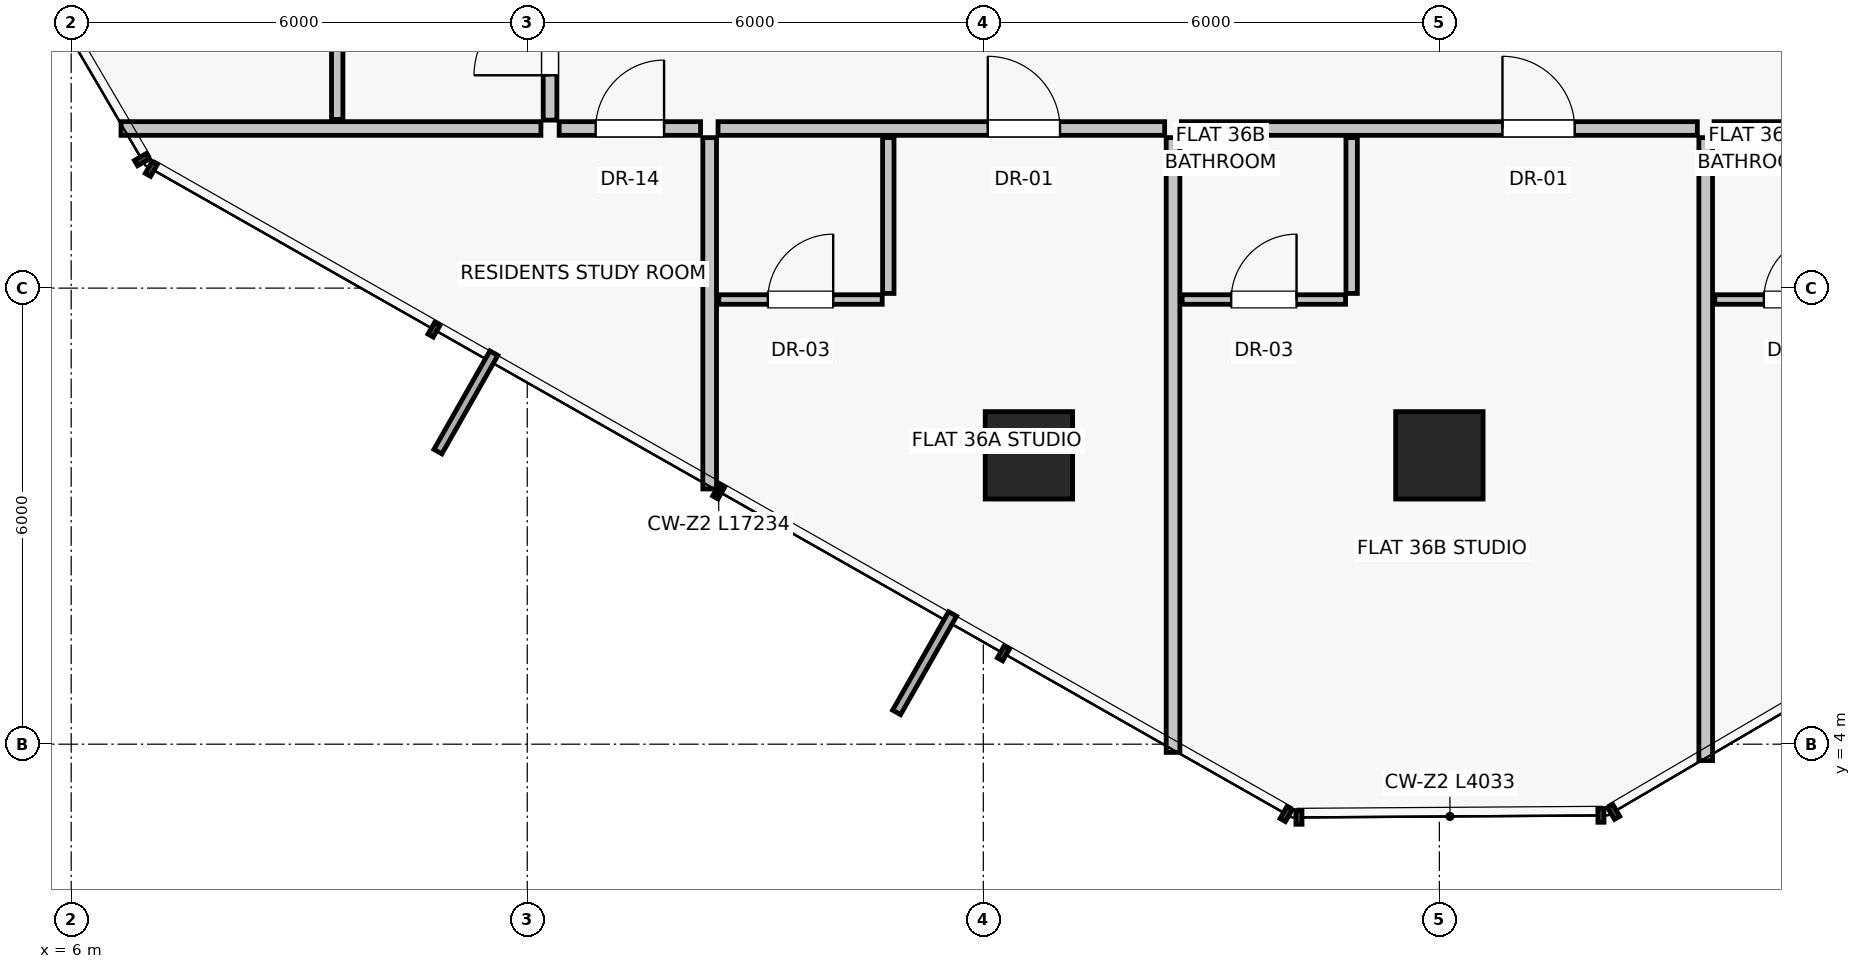
"""IFC4 building model, lengths in metres.
Left out: names, types, materials, properties, quantities, classifications, styles, units other than length and angle.
Written with IfcOpenShell. Run it as: python <this file> out.ifc"""

import sys

from ifc_helpers import new_model, si_unit, direction, frame, frame_2d, origin, origin_2d, place, context, subcontext, project, spatial, rectangle, extrude, source, transform, mapped, element, fill, save


model = new_model("IFC4")
c1 = context("Model", 3, precision=1e-05, world=origin(), true_north=direction((0.0, 1.0)))
c2 = subcontext(c1, "Body", "Model", "MODEL_VIEW")
j1 = project(units=[si_unit("LENGTHUNIT", "METRE"), si_unit("PLANEANGLEUNIT", "RADIAN")], contexts=[c1])
p1 = place(None, origin())
s1 = spatial("IfcSite", under=j1, at=p1, CompositionType="ELEMENT")
p2 = place(p1, origin())
s2 = spatial("IfcBuilding", under=s1, at=p2, CompositionType="ELEMENT")
p3 = place(p2, frame((0.0, 0.0, 129.5)))
s3 = spatial("IfcBuildingStorey", under=s2, at=p3, CompositionType="ELEMENT", Elevation=129.5)
for number, where, z_axis, x_axis in (
    (1, (18.6, 7.8, 0.0), (0.0, 0.0, 1.0), (1.0, 0.0, 0.0)),
    (2, (24.0, 7.8, 0.0), (0.0, 0.0, 1.0), (1.0, 0.0, 0.0)),
):
    element("IfcColumn", number, at=place(p3, frame(where, z_axis=z_axis, x_axis=x_axis)), inside=s3, PredefinedType="COLUMN", context=c2, shape_type="SweptSolid", body=[
        extrude(rectangle(XDim=1.15, YDim=1.15, at=origin_2d()), origin(), (0.0, 0.0, 1.0), 3.25),
    ])
p4 = place(p3, frame((14.4, 11.98, 0.0), z_axis=(0.0, 0.0, 1.0), x_axis=(0.0, -1.0, 0.0)))
e3 = element("IfcWall", 3, at=p4, inside=s3, PredefinedType="PARTITIONING", context=c2, shape_type="SweptSolid", body=[
    extrude(rectangle(XDim=4.623, YDim=0.18, at=frame_2d((2.311, 0.0))), origin(), (0.0, 0.0, 1.0), 3.0),
])
p5 = place(p3, frame((14.51, 12.1, 0.0), z_axis=(0.0, 0.0, 1.0), x_axis=(1.0, 0.0, 0.0)))
e4 = element("IfcWall", 4, at=p5, inside=s3, PredefinedType="PARTITIONING", context=c2, shape_type="SweptSolid", body=[
    extrude(rectangle(XDim=5.876, YDim=0.18, at=frame_2d((2.938, 0.0))), origin(), (0.0, 0.0, 1.0), 2.58),
])
p6 = place(p5, frame((3.549, 0.0, 0.0)))
e5 = element("IfcOpeningElement", 5, at=p6, cuts=e4, PredefinedType="OPENING", context=c2, shape_type="SweptSolid", body=[
    extrude(rectangle(XDim=0.95, YDim=2.02, at=frame_2d((0.475, 1.01))), frame((0.0, 0.1, 0.0), z_axis=(0.0, -1.0, 0.0), x_axis=(1.0, 0.0, 0.0)), (0.0, 0.0, 1.0), 0.2),
])
p7 = place(p3, frame((16.75, 11.98, 0.0), z_axis=(0.0, 0.0, 1.0), x_axis=(0.0, -1.0, 0.0)))
e6 = element("IfcWall", 6, at=p7, inside=s3, PredefinedType="PARTITIONING", context=c2, shape_type="SweptSolid", body=[
    extrude(rectangle(XDim=2.05, YDim=0.15, at=frame_2d((1.025, 0.0))), origin(), (0.0, 0.0, 1.0), 3.0),
])
p8 = place(p3, frame((14.52, 9.85, 0.0), z_axis=(0.0, 0.0, 1.0), x_axis=(1.0, 0.0, 0.0)))
e7 = element("IfcWall", 7, at=p8, inside=s3, PredefinedType="PARTITIONING", context=c2, shape_type="SweptSolid", body=[
    extrude(rectangle(XDim=2.15, YDim=0.125, at=frame_2d((1.075, 0.0))), origin(), (0.0, 0.0, 1.0), 3.0),
])
p9 = place(p8, frame((0.645, 0.0, 0.0)))
e8 = element("IfcOpeningElement", 8, at=p9, cuts=e7, PredefinedType="OPENING", context=c2, shape_type="SweptSolid", body=[
    extrude(rectangle(XDim=0.86, YDim=2.01, at=frame_2d((0.43, 1.005))), frame((0.0, 0.073, 0.0), z_axis=(0.0, -1.0, 0.0), x_axis=(1.0, 0.0, 0.0)), (0.0, 0.0, 1.0), 0.145),
])
p10 = place(p3, frame((20.496, 11.98, 0.0), z_axis=(0.0, 0.0, 1.0), x_axis=(0.0, -1.0, 0.0)))
e9 = element("IfcWall", 9, at=p10, inside=s3, PredefinedType="PARTITIONING", context=c2, shape_type="SweptSolid", body=[
    extrude(rectangle(XDim=8.088, YDim=0.18, at=frame_2d((4.044, 0.0))), origin(), (0.0, 0.0, 1.0), 3.0),
])
p11 = place(p3, frame((20.606, 12.1, 0.0), z_axis=(0.0, 0.0, 1.0), x_axis=(1.0, 0.0, 0.0)))
e10 = element("IfcWall", 10, at=p11, inside=s3, PredefinedType="PARTITIONING", context=c2, shape_type="SweptSolid", body=[
    extrude(rectangle(XDim=6.788, YDim=0.18, at=frame_2d((3.394, 0.0))), origin(), (0.0, 0.0, 1.0), 2.58),
])
p12 = place(p11, frame((4.224, 0.0, 0.0)))
e11 = element("IfcOpeningElement", 11, at=p12, cuts=e10, PredefinedType="OPENING", context=c2, shape_type="SweptSolid", body=[
    extrude(rectangle(XDim=0.95, YDim=2.02, at=frame_2d((0.475, 1.01))), frame((0.0, 0.1, 0.0), z_axis=(0.0, -1.0, 0.0), x_axis=(1.0, 0.0, 0.0)), (0.0, 0.0, 1.0), 0.2),
])
p13 = place(p3, frame((22.846, 11.98, 0.0), z_axis=(0.0, 0.0, 1.0), x_axis=(0.0, -1.0, 0.0)))
e12 = element("IfcWall", 12, at=p13, inside=s3, PredefinedType="PARTITIONING", context=c2, shape_type="SweptSolid", body=[
    extrude(rectangle(XDim=2.05, YDim=0.15, at=frame_2d((1.025, 0.0))), origin(), (0.0, 0.0, 1.0), 3.0),
])
p14 = place(p3, frame((20.616, 9.85, 0.0), z_axis=(0.0, 0.0, 1.0), x_axis=(1.0, 0.0, 0.0)))
e13 = element("IfcWall", 13, at=p14, inside=s3, PredefinedType="PARTITIONING", context=c2, shape_type="SweptSolid", body=[
    extrude(rectangle(XDim=2.15, YDim=0.125, at=frame_2d((1.075, 0.0))), origin(), (0.0, 0.0, 1.0), 3.0),
])
p15 = place(p14, frame((0.645, 0.0, 0.0)))
e14 = element("IfcOpeningElement", 14, at=p15, cuts=e13, PredefinedType="OPENING", context=c2, shape_type="SweptSolid", body=[
    extrude(rectangle(XDim=0.86, YDim=2.01, at=frame_2d((0.43, 1.005))), frame((0.0, 0.073, 0.0), z_axis=(0.0, -1.0, 0.0), x_axis=(1.0, 0.0, 0.0)), (0.0, 0.0, 1.0), 0.145),
])
p16 = place(p3, frame((27.504, 11.98, 0.0), z_axis=(0.0, 0.0, 1.0), x_axis=(0.0, -1.0, 0.0)))
e15 = element("IfcWall", 15, at=p16, inside=s3, PredefinedType="PARTITIONING", context=c2, shape_type="SweptSolid", body=[
    extrude(rectangle(XDim=8.196, YDim=0.18, at=frame_2d((4.098, 0.0))), origin(), (0.0, 0.0, 1.0), 3.0),
])
p17 = place(p3, frame((27.614, 12.1, 0.0), z_axis=(0.0, 0.0, 1.0), x_axis=(1.0, 0.0, 0.0)))
e16 = element("IfcWall", 16, at=p17, inside=s3, PredefinedType="PARTITIONING", context=c2, shape_type="SweptSolid", body=[
    extrude(rectangle(XDim=5.876, YDim=0.18, at=frame_2d((2.938, 0.0))), origin(), (0.0, 0.0, 1.0), 2.58),
])
p18 = place(p17, frame((3.549, 0.0, 0.0)))
e17 = element("IfcOpeningElement", 17, at=p18, cuts=e16, PredefinedType="OPENING", context=c2, shape_type="SweptSolid", body=[
    extrude(rectangle(XDim=0.95, YDim=2.02, at=frame_2d((0.475, 1.01))), frame((0.0, 0.1, 0.0), z_axis=(0.0, -1.0, 0.0), x_axis=(1.0, 0.0, 0.0)), (0.0, 0.0, 1.0), 0.2),
])
p19 = place(p3, frame((27.624, 9.85, 0.0), z_axis=(0.0, 0.0, 1.0), x_axis=(1.0, 0.0, 0.0)))
e18 = element("IfcWall", 18, at=p19, inside=s3, PredefinedType="PARTITIONING", context=c2, shape_type="SweptSolid", body=[
    extrude(rectangle(XDim=2.15, YDim=0.125, at=frame_2d((1.075, 0.0))), origin(), (0.0, 0.0, 1.0), 3.0),
])
p20 = place(p19, frame((0.645, 0.0, 0.0)))
e19 = element("IfcOpeningElement", 19, at=p20, cuts=e18, PredefinedType="OPENING", context=c2, shape_type="SweptSolid", body=[
    extrude(rectangle(XDim=0.86, YDim=2.01, at=frame_2d((0.43, 1.005))), frame((0.0, 0.073, 0.0), z_axis=(0.0, -1.0, 0.0), x_axis=(1.0, 0.0, 0.0)), (0.0, 0.0, 1.0), 0.145),
])
p21 = place(p3, frame((12.18, 12.1, 0.0), z_axis=(0.0, 0.0, 1.0), x_axis=(-1.0, 0.0, 0.0)))
e20 = element("IfcWall", 20, at=p21, inside=s3, PredefinedType="PARTITIONING", context=c2, shape_type="SweptSolid", body=[
    extrude(rectangle(XDim=5.524, YDim=0.18, at=frame_2d((2.762, 0.0))), origin(), (0.0, 0.0, 1.0), 3.0),
])
p22 = place(p3, frame((12.3, 12.21, 0.0), z_axis=(0.0, 0.0, 1.0), x_axis=(0.0, 1.0, 0.0)))
e21 = element("IfcWall", 21, at=p22, inside=s3, PredefinedType="PARTITIONING", context=c2, shape_type="SweptSolid", body=[
    extrude(rectangle(XDim=2.18, YDim=0.18, at=frame_2d((1.09, 0.0))), origin(), (0.0, 0.0, 1.0), 3.0),
])
p23 = place(p22, frame((0.59, 0.0, 0.0)))
e22 = element("IfcOpeningElement", 22, at=p23, cuts=e21, PredefinedType="OPENING", context=c2, shape_type="SweptSolid", body=[
    extrude(rectangle(XDim=1.0, YDim=2.01, at=frame_2d((0.5, 1.005))), frame((0.0, 0.1, 0.0), z_axis=(0.0, -1.0, 0.0), x_axis=(1.0, 0.0, 0.0)), (0.0, 0.0, 1.0), 0.2),
])
p24 = place(p3, frame((9.5, 12.22, 0.0), z_axis=(0.0, 0.0, 1.0), x_axis=(0.0, 1.0, 0.0)))
e23 = element("IfcWall", 23, at=p24, inside=s3, PredefinedType="PARTITIONING", context=c2, shape_type="SweptSolid", body=[
    extrude(rectangle(XDim=2.2, YDim=0.15, at=frame_2d((1.1, 0.0))), origin(), (0.0, 0.0, 1.0), 3.0),
])
p25 = place(p3, frame((12.42, 12.1, 0.0), z_axis=(0.0, 0.0, 1.0), x_axis=(1.0, 0.0, 0.0)))
e24 = element("IfcWall", 24, at=p25, inside=s3, PredefinedType="PARTITIONING", context=c2, shape_type="SweptSolid", body=[
    extrude(rectangle(XDim=1.86, YDim=0.18, at=frame_2d((0.93, 0.0))), origin(), (0.0, 0.0, 1.0), 3.0),
])
p26 = place(p25, frame((0.48, 0.0, 0.0)))
e25 = element("IfcOpeningElement", 25, at=p26, cuts=e24, PredefinedType="OPENING", context=c2, shape_type="SweptSolid", body=[
    extrude(rectangle(XDim=0.9, YDim=2.01, at=frame_2d((0.45, 1.005))), frame((0.0, 0.1, 0.0), z_axis=(0.0, -1.0, 0.0), x_axis=(1.0, 0.0, 0.0)), (0.0, 0.0, 1.0), 0.2),
])
m1 = source(origin(), c2, "Body", "SweptSolid", [
    extrude(rectangle(XDim=0.95, YDim=2.02, at=frame_2d((0.475, 1.01))), frame((0.0, 0.025, 0.0), z_axis=(0.0, -1.0, 0.0), x_axis=(1.0, 0.0, 0.0)), (0.0, 0.0, 1.0), 0.05),
])
p27 = place(p6, origin())
e26 = element("IfcDoor", 26, at=p27, inside=s3, OperationType="SINGLE_SWING_LEFT", PredefinedType="DOOR", context=c2, shape_type="MappedRepresentation", body=[
    mapped(m1, transform((0.0, 0.0, 0.0), scale=1.0)),
])
fill(e5, e26)
m2 = source(origin(), c2, "Body", "SweptSolid", [
    extrude(rectangle(XDim=0.86, YDim=2.01, at=frame_2d((0.43, 1.005))), frame((0.0, 0.025, 0.0), z_axis=(0.0, -1.0, 0.0), x_axis=(1.0, 0.0, 0.0)), (0.0, 0.0, 1.0), 0.05),
])
p28 = place(p9, origin())
e27 = element("IfcDoor", 27, at=p28, inside=s3, OperationType="SINGLE_SWING_RIGHT", PredefinedType="DOOR", context=c2, shape_type="MappedRepresentation", body=[
    mapped(m2, transform((0.0, 0.0, 0.0), scale=1.0)),
])
fill(e8, e27)
p29 = place(p12, origin())
e28 = element("IfcDoor", 28, at=p29, inside=s3, OperationType="SINGLE_SWING_LEFT", PredefinedType="DOOR", context=c2, shape_type="MappedRepresentation", body=[
    mapped(m1, transform((0.0, 0.0, 0.0), scale=1.0)),
])
fill(e11, e28)
p30 = place(p15, origin())
e29 = element("IfcDoor", 29, at=p30, inside=s3, OperationType="SINGLE_SWING_RIGHT", PredefinedType="DOOR", context=c2, shape_type="MappedRepresentation", body=[
    mapped(m2, transform((0.0, 0.0, 0.0), scale=1.0)),
])
fill(e14, e29)
p31 = place(p20, origin())
e30 = element("IfcDoor", 30, at=p31, inside=s3, OperationType="SINGLE_SWING_RIGHT", PredefinedType="DOOR", context=c2, shape_type="MappedRepresentation", body=[
    mapped(m2, transform((0.0, 0.0, 0.0), scale=1.0)),
])
fill(e19, e30)
m3 = source(origin(), c2, "Body", "SweptSolid", [
    extrude(rectangle(XDim=1.0, YDim=2.01, at=frame_2d((0.5, 1.005))), frame((0.0, 0.025, 0.0), z_axis=(0.0, -1.0, 0.0), x_axis=(1.0, 0.0, 0.0)), (0.0, 0.0, 1.0), 0.05),
])
p32 = place(p23, origin())
e31 = element("IfcDoor", 31, at=p32, inside=s3, OperationType="SINGLE_SWING_LEFT", PredefinedType="DOOR", context=c2, shape_type="MappedRepresentation", body=[
    mapped(m3, transform((0.0, 0.0, 0.0), scale=1.0)),
])
fill(e22, e31)
m4 = source(origin(), c2, "Body", "SweptSolid", [
    extrude(rectangle(XDim=0.9, YDim=2.01, at=frame_2d((0.45, 1.005))), frame((0.0, 0.025, 0.0), z_axis=(0.0, -1.0, 0.0), x_axis=(1.0, 0.0, 0.0)), (0.0, 0.0, 1.0), 0.05),
])
p33 = place(p26, origin())
e32 = element("IfcDoor", 32, at=p33, inside=s3, OperationType="SINGLE_SWING_RIGHT", PredefinedType="DOOR", context=c2, shape_type="MappedRepresentation", body=[
    mapped(m4, transform((0.0, 0.0, 0.0), scale=1.0)),
])
fill(e25, e32)
save(model, sys.argv[1])
